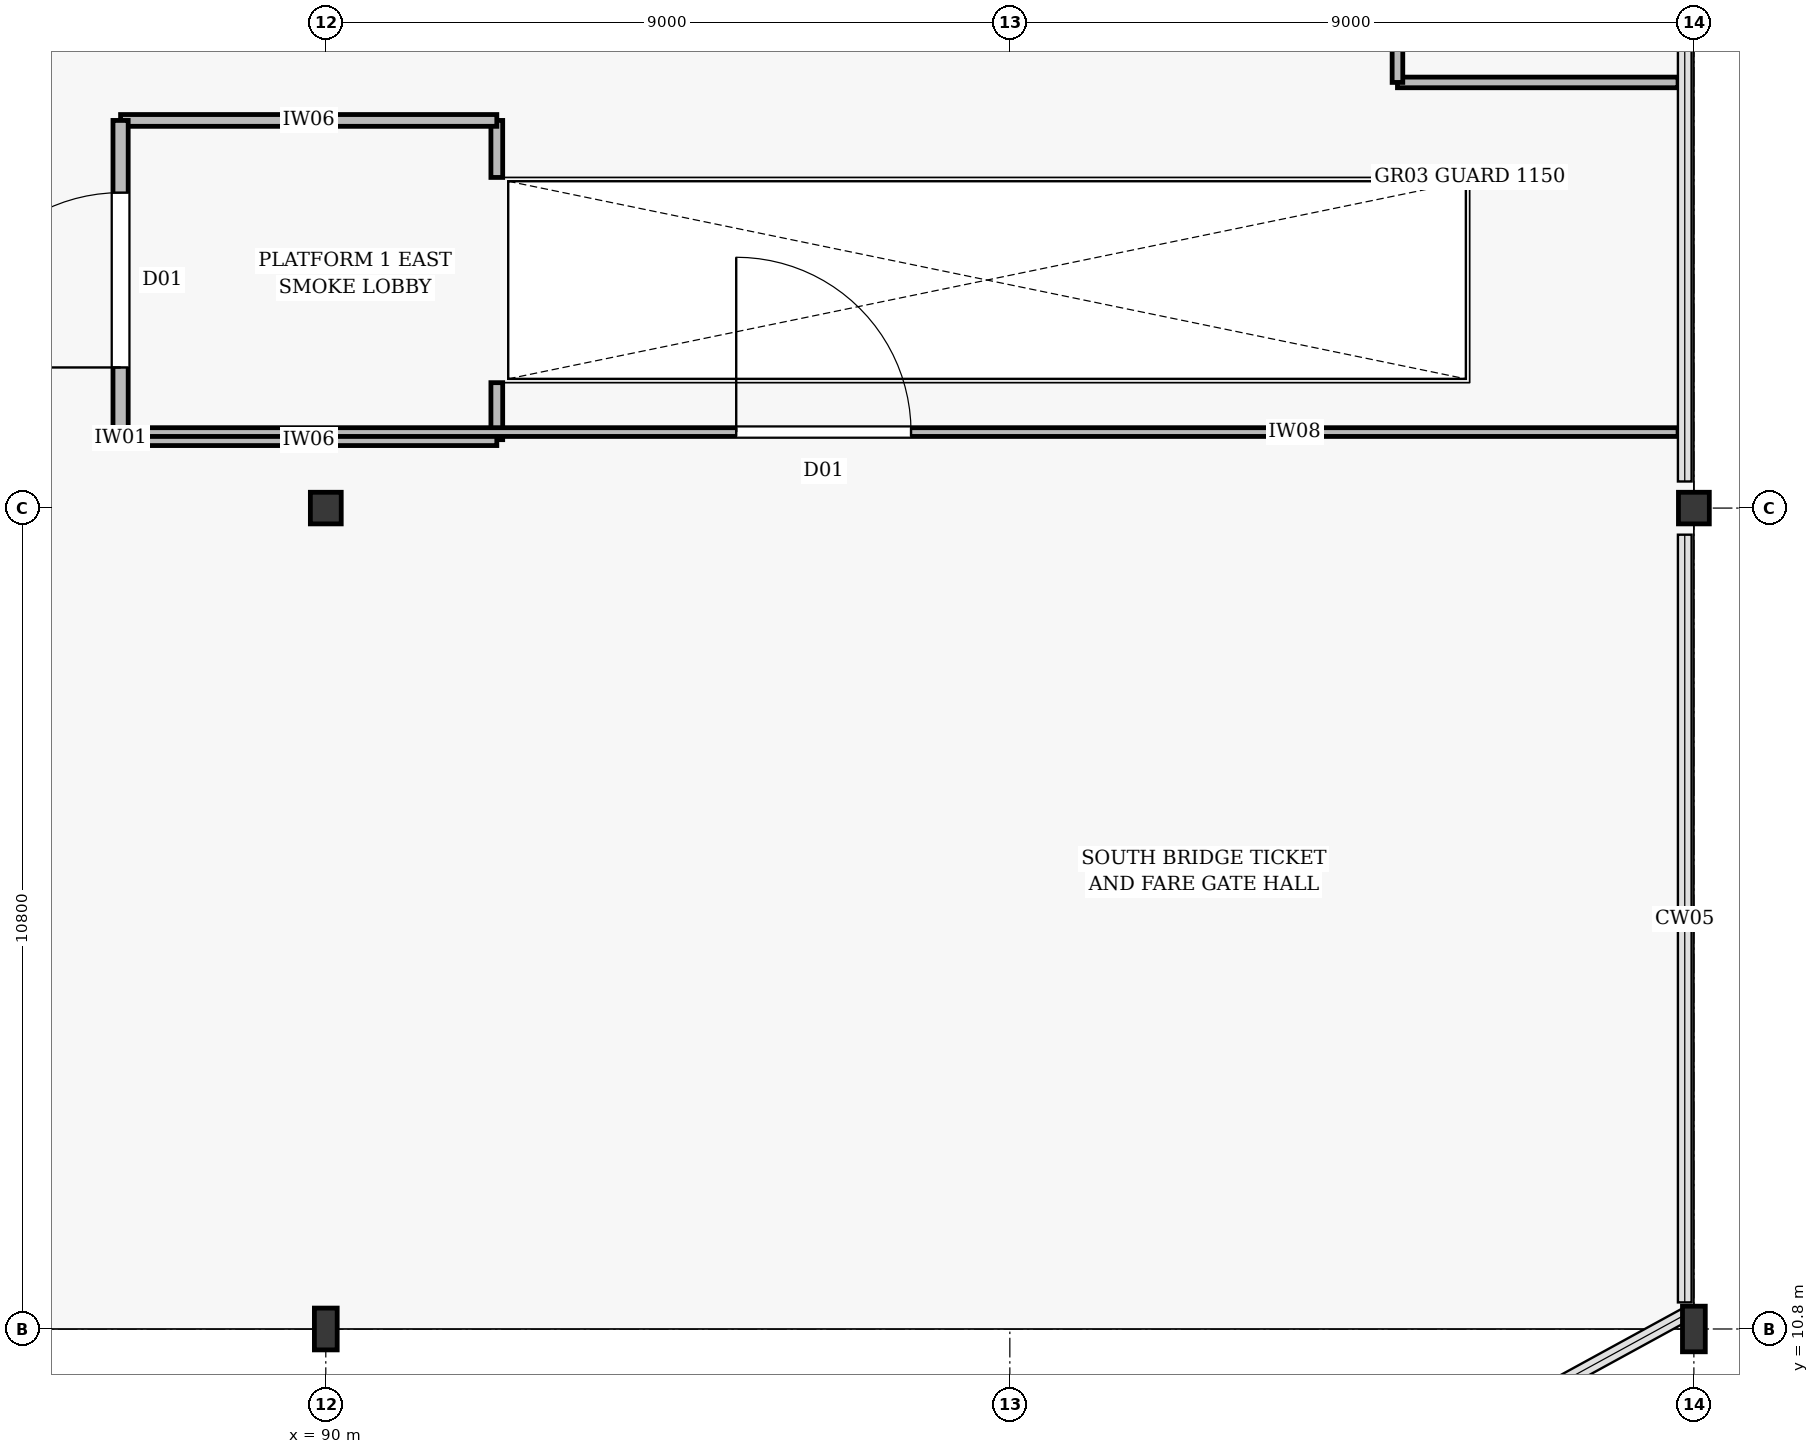
"""IFC4 building model, lengths in metres.
Left out: names, types, materials, properties, quantities, classifications, styles, units other than length and angle.
Written with IfcOpenShell. Run it as: python <this file> out.ifc"""

import sys

from ifc_helpers import new_model, si_unit, direction, frame, frame_2d, origin, origin_2d, place, context, subcontext, project, spatial, rectangle, i_section, extrude, element, fill, save


model = new_model("IFC4")
c1 = context("Model", 3, precision=1e-05, world=origin(), true_north=direction((0.0, 1.0)))
c2 = subcontext(c1, "Body", "Model", "MODEL_VIEW")
j1 = project(units=[si_unit("LENGTHUNIT", "METRE"), si_unit("PLANEANGLEUNIT", "RADIAN")], contexts=[c1])
p1 = place(None, origin())
s1 = spatial("IfcSite", under=j1, at=p1, CompositionType="ELEMENT")
p2 = place(p1, origin())
s2 = spatial("IfcBuilding", under=s1, at=p2, CompositionType="ELEMENT")
p3 = place(p2, frame((0.0, 0.0, 6.6)))
s3 = spatial("IfcBuildingStorey", under=s2, at=p3, CompositionType="ELEMENT", Elevation=6.6)
p4 = place(p3, frame((90.0, 10.8, 0.0), z_axis=(0.0, 0.0, 1.0), x_axis=(1.0, 0.0, 0.0)))
e1 = element("IfcColumn", 1, at=p4, inside=s3, PredefinedType="COLUMN", context=c2, shape_type="SweptSolid", body=[
    extrude(i_section(OverallWidth=0.3, OverallDepth=0.55, WebThickness=0.015, FlangeThickness=0.029, at=origin_2d()), origin(), (0.0, 0.0, 1.0), 6.0),
])
p5 = place(p3, frame((90.0, 21.6, 0.0), z_axis=(0.0, 0.0, 1.0), x_axis=(1.0, 0.0, 0.0)))
e2 = element("IfcColumn", 2, at=p5, inside=s3, PredefinedType="COLUMN", context=c2, shape_type="SweptSolid", body=[
    extrude(i_section(OverallWidth=0.406, OverallDepth=0.416, WebThickness=0.023, FlangeThickness=0.035, at=origin_2d()), origin(), (0.0, 0.0, 1.0), 6.0),
])
p6 = place(p3, frame((108.0, 10.8, 0.0), z_axis=(0.0, 0.0, 1.0), x_axis=(1.0, 0.0, 0.0)))
e3 = element("IfcColumn", 3, at=p6, inside=s3, PredefinedType="COLUMN", context=c2, shape_type="SweptSolid", body=[
    extrude(i_section(OverallWidth=0.3, OverallDepth=0.6, WebThickness=0.015, FlangeThickness=0.029, at=origin_2d()), origin(), (0.0, 0.0, 1.0), 6.0),
])
p7 = place(p3, frame((108.0, 21.6, 0.0), z_axis=(0.0, 0.0, 1.0), x_axis=(1.0, 0.0, 0.0)))
e4 = element("IfcColumn", 4, at=p7, inside=s3, PredefinedType="COLUMN", context=c2, shape_type="SweptSolid", body=[
    extrude(i_section(OverallWidth=0.406, OverallDepth=0.416, WebThickness=0.023, FlangeThickness=0.035, at=origin_2d()), origin(), (0.0, 0.0, 1.0), 6.0),
])
for number, where, z_axis, x_axis in (
    (5, (92.25, 22.5, 0.0), (0.0, 0.0, 1.0), (0.0, 1.0, 0.0)),
    (6, (92.25, 25.95, 0.0), (0.0, 0.0, 1.0), (0.0, 1.0, 0.0)),
):
    element("IfcWall", number, at=place(p3, frame(where, z_axis=z_axis, x_axis=x_axis)), inside=s3, PredefinedType="PARTITIONING", context=c2, shape_type="SweptSolid", body=[
        extrude(rectangle(XDim=0.75, YDim=0.155, at=frame_2d((0.375, 0.0))), origin(), (0.0, 0.0, 1.0), 2.62),
    ])
for number, where, z_axis, x_axis in (
    (7, (87.3, 22.5, 0.0), (0.0, 0.0, 1.0), (1.0, 0.0, 0.0)),
    (8, (87.3, 26.7, 0.0), (0.0, 0.0, 1.0), (1.0, 0.0, 0.0)),
):
    element("IfcWall", number, at=place(p3, frame(where, z_axis=z_axis, x_axis=x_axis)), inside=s3, PredefinedType="PARTITIONING", context=c2, shape_type="SweptSolid", body=[
        extrude(rectangle(XDim=4.95, YDim=0.155, at=frame_2d((2.475, 0.0))), origin(), (0.0, 0.0, 1.0), 2.62),
    ])
p8 = place(p3, frame((87.3, 22.5, 0.0), z_axis=(0.0, 0.0, 1.0), x_axis=(0.0, 1.0, 0.0)))
e9 = element("IfcWall", 9, at=p8, inside=s3, PredefinedType="PARTITIONING", context=c2, shape_type="SweptSolid", body=[
    extrude(rectangle(XDim=4.2, YDim=0.2, at=frame_2d((2.1, 0.0))), origin(), (0.0, 0.0, 1.0), 2.62),
])
p9 = place(p8, frame((0.95, 0.0, 0.005)))
e10 = element("IfcOpeningElement", 10, at=p9, cuts=e9, PredefinedType="OPENING", context=c2, shape_type="SweptSolid", body=[
    extrude(rectangle(XDim=2.3, YDim=2.4, at=frame_2d((1.15, 1.2))), frame((0.0, 0.112, 0.0), z_axis=(0.0, -1.0, 0.0), x_axis=(1.0, 0.0, 0.0)), (0.0, 0.0, 1.0), 0.224),
])
p10 = place(p3, frame((87.398, 22.6, 0.0), z_axis=(0.0, 0.0, 1.0), x_axis=(1.0, 0.0, 0.0)))
e11 = element("IfcWall", 11, at=p10, inside=s3, PredefinedType="PARTITIONING", context=c2, shape_type="SweptSolid", body=[
    extrude(rectangle(XDim=20.394, YDim=0.115, at=frame_2d((10.197, 0.0))), origin(), (0.0, 0.0, 1.0), 5.06),
])
p11 = place(p10, frame((8.002, 0.0, 0.005)))
e12 = element("IfcOpeningElement", 12, at=p11, cuts=e11, PredefinedType="OPENING", context=c2, shape_type="SweptSolid", body=[
    extrude(rectangle(XDim=2.3, YDim=2.4, at=frame_2d((1.15, 1.2))), frame((0.0, 0.069, 0.0), z_axis=(0.0, -1.0, 0.0), x_axis=(1.0, 0.0, 0.0)), (0.0, 0.0, 1.0), 0.139),
])
p12 = place(p3, frame((104.1, 27.2, 0.0), z_axis=(0.0, 0.0, 1.0), x_axis=(1.0, 0.0, 0.0)))
e13 = element("IfcWall", 13, at=p12, inside=s3, PredefinedType="PARTITIONING", context=c2, shape_type="SweptSolid", body=[
    extrude(rectangle(XDim=3.692, YDim=0.14, at=frame_2d((1.846, 0.0))), origin(), (0.0, 0.0, 1.0), 5.06),
])
p13 = place(p3, frame((104.1, 27.2, 0.0), z_axis=(0.0, 0.0, 1.0), x_axis=(0.0, 1.0, 0.0)))
e14 = element("IfcWall", 14, at=p13, inside=s3, PredefinedType="PARTITIONING", context=c2, shape_type="SweptSolid", body=[
    extrude(rectangle(XDim=34.6, YDim=0.14, at=frame_2d((17.3, 0.0))), origin(), (0.0, 0.0, 1.0), 5.06),
])
p14 = place(p13, frame((7.0, 0.0, 0.005)))
e15 = element("IfcOpeningElement", 15, at=p14, cuts=e14, PredefinedType="OPENING", context=c2, shape_type="SweptSolid", body=[
    extrude(rectangle(XDim=1.95, YDim=2.3, at=frame_2d((0.975, 1.15))), frame((0.0, 0.082, 0.0), z_axis=(0.0, -1.0, 0.0), x_axis=(1.0, 0.0, 0.0)), (0.0, 0.0, 1.0), 0.164),
])
p15 = place(p13, frame((23.0, 0.0, 0.005)))
e16 = element("IfcOpeningElement", 16, at=p15, cuts=e14, PredefinedType="OPENING", context=c2, shape_type="SweptSolid", body=[
    extrude(rectangle(XDim=1.65, YDim=2.2, at=frame_2d((0.825, 1.1))), frame((0.0, 0.082, 0.0), z_axis=(0.0, -1.0, 0.0), x_axis=(1.0, 0.0, 0.0)), (0.0, 0.0, 1.0), 0.164),
])
p16 = place(p9, origin())
e17 = element("IfcDoor", 17, at=p16, inside=s3, OperationType="DOUBLE_DOOR_SINGLE_SWING", PredefinedType="DOOR", context=c2, shape_type="SweptSolid", body=[
    extrude(rectangle(XDim=2.3, YDim=2.4, at=frame_2d((1.15, 1.2))), frame((0.0, 0.025, 0.0), z_axis=(0.0, -1.0, 0.0), x_axis=(1.0, 0.0, 0.0)), (0.0, 0.0, 1.0), 0.05),
])
fill(e10, e17)
p17 = place(p11, origin())
e18 = element("IfcDoor", 18, at=p17, inside=s3, OperationType="DOUBLE_DOOR_SINGLE_SWING", PredefinedType="DOOR", context=c2, shape_type="SweptSolid", body=[
    extrude(rectangle(XDim=2.3, YDim=2.4, at=frame_2d((1.15, 1.2))), frame((0.0, 0.025, 0.0), z_axis=(0.0, -1.0, 0.0), x_axis=(1.0, 0.0, 0.0)), (0.0, 0.0, 1.0), 0.05),
])
fill(e12, e18)
save(model, sys.argv[1])
